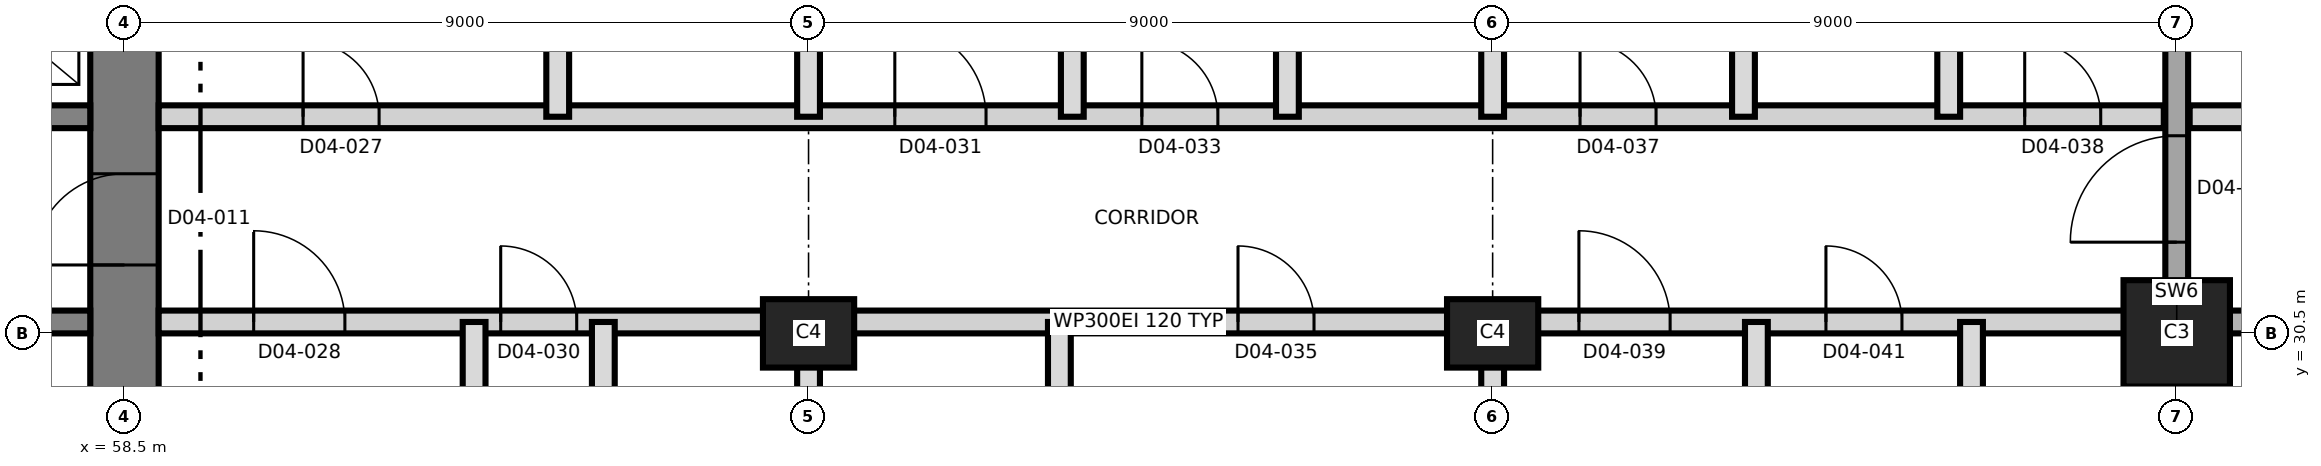
"""IFC4 building model, lengths in metres.
Left out: names, types, materials, properties, quantities, classifications, styles, units other than length and angle.
Written with IfcOpenShell. Run it as: python <this file> out.ifc"""

import sys

from ifc_helpers import new_model, si_unit, direction, frame, frame_2d, origin, origin_2d, place, context, subcontext, project, spatial, rectangle, extrude, element, fill, save


model = new_model("IFC4")
c1 = context("Model", 3, precision=1e-05, world=origin(), true_north=direction((0.0, 1.0)))
c2 = subcontext(c1, "Body", "Model", "MODEL_VIEW")
j1 = project(units=[si_unit("LENGTHUNIT", "METRE"), si_unit("PLANEANGLEUNIT", "RADIAN")], contexts=[c1])
p1 = place(None, origin())
s1 = spatial("IfcSite", under=j1, at=p1, CompositionType="ELEMENT")
p2 = place(p1, origin())
s2 = spatial("IfcBuilding", under=s1, at=p2, CompositionType="ELEMENT")
p3 = place(p2, frame((0.0, 0.0, 66.8)))
s3 = spatial("IfcBuildingStorey", under=s2, at=p3, CompositionType="ELEMENT", Elevation=66.8)
p4 = place(p3, frame((58.5, 21.05, 0.0), z_axis=(0.0, 0.0, 1.0), x_axis=(0.0, 1.0, 0.0)))
e1 = element("IfcWall", 1, at=p4, inside=s3, PredefinedType="SHEAR", context=c2, shape_type="SweptSolid", body=[
    extrude(rectangle(XDim=18.9, YDim=0.9, at=frame_2d((9.45, 0.0))), origin(), (0.0, 0.0, 1.0), 3.7),
])
p5 = place(p4, frame((10.35, 0.0, 0.0)))
e2 = element("IfcOpeningElement", 2, at=p5, cuts=e1, PredefinedType="OPENING", context=c2, shape_type="SweptSolid", body=[
    extrude(rectangle(XDim=1.2, YDim=2.1, at=frame_2d((0.6, 1.05))), frame((0.0, 0.46, 0.0), z_axis=(0.0, -1.0, 0.0), x_axis=(1.0, 0.0, 0.0)), (0.0, 0.0, 1.0), 0.92),
])
p6 = place(p3, frame((31.95, 30.65, 0.0), z_axis=(0.0, 0.0, 1.0), x_axis=(1.0, 0.0, 0.0)))
e3 = element("IfcWall", 3, at=p6, inside=s3, PredefinedType="SHEAR", context=c2, shape_type="SweptSolid", body=[
    extrude(rectangle(XDim=26.1, YDim=0.3, at=frame_2d((13.05, 0.0))), origin(), (0.0, 0.0, 1.0), 3.7),
])
p7 = place(p6, frame((24.55, 0.0, 0.0)))
e4 = element("IfcOpeningElement", 4, at=p7, cuts=e3, PredefinedType="OPENING", context=c2, shape_type="SweptSolid", body=[
    extrude(rectangle(XDim=1.0, YDim=2.1, at=frame_2d((0.5, 1.05))), frame((0.0, 0.16, 0.0), z_axis=(0.0, -1.0, 0.0), x_axis=(1.0, 0.0, 0.0)), (0.0, 0.0, 1.0), 0.32),
])
p8 = place(p6, frame((11.35, 0.0, 0.0)))
e5 = element("IfcOpeningElement", 5, at=p8, cuts=e3, PredefinedType="OPENING", context=c2, shape_type="SweptSolid", body=[
    extrude(rectangle(XDim=1.0, YDim=2.1, at=frame_2d((0.5, 1.05))), frame((0.0, 0.16, 0.0), z_axis=(0.0, -1.0, 0.0), x_axis=(1.0, 0.0, 0.0)), (0.0, 0.0, 1.0), 0.32),
])
p9 = place(p3, frame((31.95, 33.35, 0.0), z_axis=(0.0, 0.0, 1.0), x_axis=(1.0, 0.0, 0.0)))
e6 = element("IfcWall", 6, at=p9, inside=s3, PredefinedType="SHEAR", context=c2, shape_type="SweptSolid", body=[
    extrude(rectangle(XDim=26.1, YDim=0.3, at=frame_2d((13.05, 0.0))), origin(), (0.0, 0.0, 1.0), 3.7),
])
p10 = place(p9, frame((13.7, 0.0, 0.0)))
e7 = element("IfcOpeningElement", 7, at=p10, cuts=e6, PredefinedType="OPENING", context=c2, shape_type="SweptSolid", body=[
    extrude(rectangle(XDim=1.4, YDim=2.1, at=frame_2d((0.7, 1.05))), frame((0.0, 0.16, 0.0), z_axis=(0.0, -1.0, 0.0), x_axis=(1.0, 0.0, 0.0)), (0.0, 0.0, 1.0), 0.32),
])
p11 = place(p9, frame((5.175, 0.0, 0.0)))
e8 = element("IfcOpeningElement", 8, at=p11, cuts=e6, PredefinedType="OPENING", context=c2, shape_type="SweptSolid", body=[
    extrude(rectangle(XDim=1.2, YDim=2.1, at=frame_2d((0.6, 1.05))), frame((0.0, 0.16, 0.0), z_axis=(0.0, -1.0, 0.0), x_axis=(1.0, 0.0, 0.0)), (0.0, 0.0, 1.0), 0.32),
])
p12 = place(p9, frame((19.725, 0.0, 0.0)))
e9 = element("IfcOpeningElement", 9, at=p12, cuts=e6, PredefinedType="OPENING", context=c2, shape_type="SweptSolid", body=[
    extrude(rectangle(XDim=1.2, YDim=2.1, at=frame_2d((0.6, 1.05))), frame((0.0, 0.16, 0.0), z_axis=(0.0, -1.0, 0.0), x_axis=(1.0, 0.0, 0.0)), (0.0, 0.0, 1.0), 0.32),
])
for number, where, z_axis, x_axis in (
    (10, (67.5, 30.5, 0.0), (0.0, 0.0, 1.0), (1.0, 0.0, 0.0)),
    (11, (76.5, 30.5, 0.0), (0.0, 0.0, 1.0), (1.0, 0.0, 0.0)),
):
    element("IfcColumn", number, at=place(p3, frame(where, z_axis=z_axis, x_axis=x_axis)), inside=s3, PredefinedType="COLUMN", context=c2, shape_type="SweptSolid", body=[
        extrude(rectangle(XDim=1.2, YDim=0.9, at=origin_2d()), origin(), (0.0, 0.0, 1.0), 3.7),
    ])
p13 = place(p3, frame((85.5, 30.5, 0.0), z_axis=(0.0, 0.0, 1.0), x_axis=(1.0, 0.0, 0.0)))
e12 = element("IfcColumn", 12, at=p13, inside=s3, PredefinedType="COLUMN", context=c2, shape_type="SweptSolid", body=[
    extrude(rectangle(XDim=1.4, YDim=1.4, at=origin_2d()), origin(), (0.0, 0.0, 1.0), 3.7),
])
p14 = place(p3, frame((85.5, 19.17, 0.0), z_axis=(0.0, 0.0, 1.0), x_axis=(0.0, 1.0, 0.0)))
e13 = element("IfcWall", 13, at=p14, inside=s3, PredefinedType="SHEAR", context=c2, shape_type="SweptSolid", body=[
    extrude(rectangle(XDim=22.66, YDim=0.3, at=frame_2d((11.33, 0.0))), origin(), (0.0, 0.0, 1.0), 3.7),
])
p15 = place(p14, frame((12.53, 0.0, 0.0)))
e14 = element("IfcOpeningElement", 14, at=p15, cuts=e13, PredefinedType="OPENING", context=c2, shape_type="SweptSolid", body=[
    extrude(rectangle(XDim=1.4, YDim=2.1, at=frame_2d((0.7, 1.05))), frame((0.0, 0.16, 0.0), z_axis=(0.0, -1.0, 0.0), x_axis=(1.0, 0.0, 0.0)), (0.0, 0.0, 1.0), 0.32),
])
p16 = place(p3, frame((58.95, 30.65, 0.0), z_axis=(0.0, 0.0, 1.0), x_axis=(1.0, 0.0, 0.0)))
e15 = element("IfcWall", 15, at=p16, inside=s3, PredefinedType="PARTITIONING", context=c2, shape_type="SweptSolid", body=[
    extrude(rectangle(XDim=26.38, YDim=0.3, at=frame_2d((13.19, 0.0))), origin(), (0.0, 0.0, 1.0), 3.4),
])
p17 = place(p16, frame((1.25, 0.0, 0.0)))
e16 = element("IfcOpeningElement", 16, at=p17, cuts=e15, PredefinedType="OPENING", context=c2, shape_type="SweptSolid", body=[
    extrude(rectangle(XDim=1.2, YDim=2.1, at=frame_2d((0.6, 1.05))), frame((0.0, 0.16, 0.0), z_axis=(0.0, -1.0, 0.0), x_axis=(1.0, 0.0, 0.0)), (0.0, 0.0, 1.0), 0.32),
])
p18 = place(p16, frame((4.5, 0.0, 0.0)))
e17 = element("IfcOpeningElement", 17, at=p18, cuts=e15, PredefinedType="OPENING", context=c2, shape_type="SweptSolid", body=[
    extrude(rectangle(XDim=1.0, YDim=2.1, at=frame_2d((0.5, 1.05))), frame((0.0, 0.16, 0.0), z_axis=(0.0, -1.0, 0.0), x_axis=(1.0, 0.0, 0.0)), (0.0, 0.0, 1.0), 0.32),
])
p19 = place(p16, frame((14.2, 0.0, 0.0)))
e18 = element("IfcOpeningElement", 18, at=p19, cuts=e15, PredefinedType="OPENING", context=c2, shape_type="SweptSolid", body=[
    extrude(rectangle(XDim=1.0, YDim=2.4, at=frame_2d((0.5, 1.2))), frame((0.0, 0.16, 0.0), z_axis=(0.0, -1.0, 0.0), x_axis=(1.0, 0.0, 0.0)), (0.0, 0.0, 1.0), 0.32),
])
p20 = place(p16, frame((18.685, 0.0, 0.0)))
e19 = element("IfcOpeningElement", 19, at=p20, cuts=e15, PredefinedType="OPENING", context=c2, shape_type="SweptSolid", body=[
    extrude(rectangle(XDim=1.2, YDim=2.1, at=frame_2d((0.6, 1.05))), frame((0.0, 0.16, 0.0), z_axis=(0.0, -1.0, 0.0), x_axis=(1.0, 0.0, 0.0)), (0.0, 0.0, 1.0), 0.32),
])
p21 = place(p16, frame((21.935, 0.0, 0.0)))
e20 = element("IfcOpeningElement", 20, at=p21, cuts=e15, PredefinedType="OPENING", context=c2, shape_type="SweptSolid", body=[
    extrude(rectangle(XDim=1.0, YDim=2.1, at=frame_2d((0.5, 1.05))), frame((0.0, 0.16, 0.0), z_axis=(0.0, -1.0, 0.0), x_axis=(1.0, 0.0, 0.0)), (0.0, 0.0, 1.0), 0.32),
])
p22 = place(p3, frame((85.67, 30.65, 0.0), z_axis=(0.0, 0.0, 1.0), x_axis=(1.0, 0.0, 0.0)))
e21 = element("IfcWall", 21, at=p22, inside=s3, PredefinedType="SHEAR", context=c2, shape_type="SweptSolid", body=[
    extrude(rectangle(XDim=9.58, YDim=0.3, at=frame_2d((4.79, 0.0))), origin(), (0.0, 0.0, 1.0), 3.4),
])
p23 = place(p22, frame((2.08, 0.0, 0.0)))
e22 = element("IfcOpeningElement", 22, at=p23, cuts=e21, PredefinedType="OPENING", context=c2, shape_type="SweptSolid", body=[
    extrude(rectangle(XDim=1.2, YDim=2.1, at=frame_2d((0.6, 1.05))), frame((0.0, 0.16, 0.0), z_axis=(0.0, -1.0, 0.0), x_axis=(1.0, 0.0, 0.0)), (0.0, 0.0, 1.0), 0.32),
])
p24 = place(p22, frame((5.63, 0.0, 0.0)))
e23 = element("IfcOpeningElement", 23, at=p24, cuts=e21, PredefinedType="OPENING", context=c2, shape_type="SweptSolid", body=[
    extrude(rectangle(XDim=1.0, YDim=2.1, at=frame_2d((0.5, 1.05))), frame((0.0, 0.16, 0.0), z_axis=(0.0, -1.0, 0.0), x_axis=(1.0, 0.0, 0.0)), (0.0, 0.0, 1.0), 0.32),
])
p25 = place(p3, frame((58.95, 33.35, 0.0), z_axis=(0.0, 0.0, 1.0), x_axis=(1.0, 0.0, 0.0)))
e24 = element("IfcWall", 24, at=p25, inside=s3, PredefinedType="PARTITIONING", context=c2, shape_type="SweptSolid", body=[
    extrude(rectangle(XDim=26.38, YDim=0.3, at=frame_2d((13.19, 0.0))), origin(), (0.0, 0.0, 1.0), 3.4),
])
p26 = place(p25, frame((1.9, 0.0, 0.0)))
e25 = element("IfcOpeningElement", 25, at=p26, cuts=e24, PredefinedType="OPENING", context=c2, shape_type="SweptSolid", body=[
    extrude(rectangle(XDim=1.0, YDim=2.4, at=frame_2d((0.5, 1.2))), frame((0.0, 0.16, 0.0), z_axis=(0.0, -1.0, 0.0), x_axis=(1.0, 0.0, 0.0)), (0.0, 0.0, 1.0), 0.32),
])
p27 = place(p25, frame((9.685, 0.0, 0.0)))
e26 = element("IfcOpeningElement", 26, at=p27, cuts=e24, PredefinedType="OPENING", context=c2, shape_type="SweptSolid", body=[
    extrude(rectangle(XDim=1.2, YDim=2.1, at=frame_2d((0.6, 1.05))), frame((0.0, 0.16, 0.0), z_axis=(0.0, -1.0, 0.0), x_axis=(1.0, 0.0, 0.0)), (0.0, 0.0, 1.0), 0.32),
])
p28 = place(p25, frame((12.935, 0.0, 0.0)))
e27 = element("IfcOpeningElement", 27, at=p28, cuts=e24, PredefinedType="OPENING", context=c2, shape_type="SweptSolid", body=[
    extrude(rectangle(XDim=1.0, YDim=2.1, at=frame_2d((0.5, 1.05))), frame((0.0, 0.16, 0.0), z_axis=(0.0, -1.0, 0.0), x_axis=(1.0, 0.0, 0.0)), (0.0, 0.0, 1.0), 0.32),
])
p29 = place(p25, frame((18.7, 0.0, 0.0)))
e28 = element("IfcOpeningElement", 28, at=p29, cuts=e24, PredefinedType="OPENING", context=c2, shape_type="SweptSolid", body=[
    extrude(rectangle(XDim=1.0, YDim=2.1, at=frame_2d((0.5, 1.05))), frame((0.0, 0.16, 0.0), z_axis=(0.0, -1.0, 0.0), x_axis=(1.0, 0.0, 0.0)), (0.0, 0.0, 1.0), 0.32),
])
p30 = place(p25, frame((24.55, 0.0, 0.0)))
e29 = element("IfcOpeningElement", 29, at=p30, cuts=e24, PredefinedType="OPENING", context=c2, shape_type="SweptSolid", body=[
    extrude(rectangle(XDim=1.0, YDim=2.1, at=frame_2d((0.5, 1.05))), frame((0.0, 0.16, 0.0), z_axis=(0.0, -1.0, 0.0), x_axis=(1.0, 0.0, 0.0)), (0.0, 0.0, 1.0), 0.32),
])
p31 = place(p3, frame((85.67, 33.35, 0.0), z_axis=(0.0, 0.0, 1.0), x_axis=(1.0, 0.0, 0.0)))
e30 = element("IfcWall", 30, at=p31, inside=s3, PredefinedType="PARTITIONING", context=c2, shape_type="SweptSolid", body=[
    extrude(rectangle(XDim=9.58, YDim=0.3, at=frame_2d((4.79, 0.0))), origin(), (0.0, 0.0, 1.0), 3.4),
])
p32 = place(p31, frame((1.83, 0.0, 0.0)))
e31 = element("IfcOpeningElement", 31, at=p32, cuts=e30, PredefinedType="OPENING", context=c2, shape_type="SweptSolid", body=[
    extrude(rectangle(XDim=1.0, YDim=2.1, at=frame_2d((0.5, 1.05))), frame((0.0, 0.16, 0.0), z_axis=(0.0, -1.0, 0.0), x_axis=(1.0, 0.0, 0.0)), (0.0, 0.0, 1.0), 0.32),
])
p33 = place(p31, frame((5.63, 0.0, 0.0)))
e32 = element("IfcOpeningElement", 32, at=p33, cuts=e30, PredefinedType="OPENING", context=c2, shape_type="SweptSolid", body=[
    extrude(rectangle(XDim=1.0, YDim=2.1, at=frame_2d((0.5, 1.05))), frame((0.0, 0.16, 0.0), z_axis=(0.0, -1.0, 0.0), x_axis=(1.0, 0.0, 0.0)), (0.0, 0.0, 1.0), 0.32),
])
p34 = place(p3, frame((63.1, 19.17, 0.0), z_axis=(0.0, 0.0, 1.0), x_axis=(0.0, 1.0, 0.0)))
e33 = element("IfcWall", 33, at=p34, inside=s3, PredefinedType="PARTITIONING", context=c2, shape_type="SweptSolid", body=[
    extrude(rectangle(XDim=11.48, YDim=0.3, at=frame_2d((5.74, 0.0))), origin(), (0.0, 0.0, 1.0), 3.35),
])
p35 = place(p3, frame((64.2, 33.35, 0.0), z_axis=(0.0, 0.0, 1.0), x_axis=(0.0, 1.0, 0.0)))
e34 = element("IfcWall", 34, at=p35, inside=s3, PredefinedType="PARTITIONING", context=c2, shape_type="SweptSolid", body=[
    extrude(rectangle(XDim=3.5, YDim=0.3, at=frame_2d((1.75, 0.0))), origin(), (0.0, 0.0, 1.0), 3.4),
])
p36 = place(p3, frame((64.8, 27.45, 0.0), z_axis=(0.0, 0.0, 1.0), x_axis=(0.0, 1.0, 0.0)))
e35 = element("IfcWall", 35, at=p36, inside=s3, PredefinedType="PARTITIONING", context=c2, shape_type="SweptSolid", body=[
    extrude(rectangle(XDim=3.2, YDim=0.3, at=frame_2d((1.6, 0.0))), origin(), (0.0, 0.0, 1.0), 3.4),
])
p37 = place(p3, frame((67.5, 19.17, 0.0), z_axis=(0.0, 0.0, 1.0), x_axis=(0.0, 1.0, 0.0)))
e36 = element("IfcWall", 36, at=p37, inside=s3, PredefinedType="PARTITIONING", context=c2, shape_type="SweptSolid", body=[
    extrude(rectangle(XDim=11.48, YDim=0.3, at=frame_2d((5.74, 0.0))), origin(), (0.0, 0.0, 1.0), 3.35),
])
p38 = place(p3, frame((67.5, 33.35, 0.0), z_axis=(0.0, 0.0, 1.0), x_axis=(0.0, 1.0, 0.0)))
e37 = element("IfcWall", 37, at=p38, inside=s3, PredefinedType="PARTITIONING", context=c2, shape_type="SweptSolid", body=[
    extrude(rectangle(XDim=8.66, YDim=0.3, at=frame_2d((4.33, 0.0))), origin(), (0.0, 0.0, 1.0), 3.35),
])
p39 = place(p3, frame((70.8, 27.15, 0.0), z_axis=(0.0, 0.0, 1.0), x_axis=(0.0, 1.0, 0.0)))
e38 = element("IfcWall", 38, at=p39, inside=s3, PredefinedType="PARTITIONING", context=c2, shape_type="SweptSolid", body=[
    extrude(rectangle(XDim=3.5, YDim=0.3, at=frame_2d((1.75, 0.0))), origin(), (0.0, 0.0, 1.0), 3.4),
])
p40 = place(p3, frame((70.97, 33.35, 0.0), z_axis=(0.0, 0.0, 1.0), x_axis=(0.0, 1.0, 0.0)))
e39 = element("IfcWall", 39, at=p40, inside=s3, PredefinedType="PARTITIONING", context=c2, shape_type="SweptSolid", body=[
    extrude(rectangle(XDim=8.66, YDim=0.3, at=frame_2d((4.33, 0.0))), origin(), (0.0, 0.0, 1.0), 3.35),
])
p41 = place(p3, frame((73.8, 33.35, 0.0), z_axis=(0.0, 0.0, 1.0), x_axis=(0.0, 1.0, 0.0)))
e40 = element("IfcWall", 40, at=p41, inside=s3, PredefinedType="PARTITIONING", context=c2, shape_type="SweptSolid", body=[
    extrude(rectangle(XDim=3.2, YDim=0.3, at=frame_2d((1.6, 0.0))), origin(), (0.0, 0.0, 1.0), 3.4),
])
p42 = place(p3, frame((76.5, 19.17, 0.0), z_axis=(0.0, 0.0, 1.0), x_axis=(0.0, 1.0, 0.0)))
e41 = element("IfcWall", 41, at=p42, inside=s3, PredefinedType="PARTITIONING", context=c2, shape_type="SweptSolid", body=[
    extrude(rectangle(XDim=11.48, YDim=0.3, at=frame_2d((5.74, 0.0))), origin(), (0.0, 0.0, 1.0), 3.35),
])
p43 = place(p3, frame((76.5, 33.35, 0.0), z_axis=(0.0, 0.0, 1.0), x_axis=(0.0, 1.0, 0.0)))
e42 = element("IfcWall", 42, at=p43, inside=s3, PredefinedType="PARTITIONING", context=c2, shape_type="SweptSolid", body=[
    extrude(rectangle(XDim=8.66, YDim=0.3, at=frame_2d((4.33, 0.0))), origin(), (0.0, 0.0, 1.0), 3.35),
])
p44 = place(p3, frame((79.8, 33.35, 0.0), z_axis=(0.0, 0.0, 1.0), x_axis=(0.0, 1.0, 0.0)))
e43 = element("IfcWall", 43, at=p44, inside=s3, PredefinedType="PARTITIONING", context=c2, shape_type="SweptSolid", body=[
    extrude(rectangle(XDim=3.2, YDim=0.3, at=frame_2d((1.6, 0.0))), origin(), (0.0, 0.0, 1.0), 3.4),
])
p45 = place(p3, frame((79.97, 19.17, 0.0), z_axis=(0.0, 0.0, 1.0), x_axis=(0.0, 1.0, 0.0)))
e44 = element("IfcWall", 44, at=p45, inside=s3, PredefinedType="PARTITIONING", context=c2, shape_type="SweptSolid", body=[
    extrude(rectangle(XDim=11.48, YDim=0.3, at=frame_2d((5.74, 0.0))), origin(), (0.0, 0.0, 1.0), 3.35),
])
p46 = place(p3, frame((82.5, 33.35, 0.0), z_axis=(0.0, 0.0, 1.0), x_axis=(0.0, 1.0, 0.0)))
e45 = element("IfcWall", 45, at=p46, inside=s3, PredefinedType="PARTITIONING", context=c2, shape_type="SweptSolid", body=[
    extrude(rectangle(XDim=8.66, YDim=0.3, at=frame_2d((4.33, 0.0))), origin(), (0.0, 0.0, 1.0), 3.35),
])
p47 = place(p3, frame((82.8, 27.45, 0.0), z_axis=(0.0, 0.0, 1.0), x_axis=(0.0, 1.0, 0.0)))
e46 = element("IfcWall", 46, at=p47, inside=s3, PredefinedType="PARTITIONING", context=c2, shape_type="SweptSolid", body=[
    extrude(rectangle(XDim=3.2, YDim=0.3, at=frame_2d((1.6, 0.0))), origin(), (0.0, 0.0, 1.0), 3.4),
])
p48 = place(p5, origin())
e47 = element("IfcDoor", 47, at=p48, inside=s3, OperationType="SINGLE_SWING_LEFT", PredefinedType="DOOR", context=c2, shape_type="SweptSolid", body=[
    extrude(rectangle(XDim=1.2, YDim=2.1, at=frame_2d((0.6, 1.05))), frame((0.0, 0.025, 0.0), z_axis=(0.0, -1.0, 0.0), x_axis=(1.0, 0.0, 0.0)), (0.0, 0.0, 1.0), 0.05),
])
fill(e2, e47)
p49 = place(p26, origin())
e48 = element("IfcDoor", 48, at=p49, inside=s3, OperationType="SINGLE_SWING_LEFT", PredefinedType="DOOR", context=c2, shape_type="SweptSolid", body=[
    extrude(rectangle(XDim=1.0, YDim=2.4, at=frame_2d((0.5, 1.2))), frame((0.0, 0.025, 0.0), z_axis=(0.0, -1.0, 0.0), x_axis=(1.0, 0.0, 0.0)), (0.0, 0.0, 1.0), 0.05),
])
fill(e25, e48)
p50 = place(p17, origin())
e49 = element("IfcDoor", 49, at=p50, inside=s3, OperationType="SINGLE_SWING_RIGHT", PredefinedType="DOOR", context=c2, shape_type="SweptSolid", body=[
    extrude(rectangle(XDim=1.2, YDim=2.1, at=frame_2d((0.6, 1.05))), frame((0.0, 0.025, 0.0), z_axis=(0.0, -1.0, 0.0), x_axis=(1.0, 0.0, 0.0)), (0.0, 0.0, 1.0), 0.05),
])
fill(e16, e49)
p51 = place(p18, origin())
e50 = element("IfcDoor", 50, at=p51, inside=s3, OperationType="SINGLE_SWING_LEFT", PredefinedType="DOOR", context=c2, shape_type="SweptSolid", body=[
    extrude(rectangle(XDim=1.0, YDim=2.1, at=frame_2d((0.5, 1.05))), frame((0.0, 0.025, 0.0), z_axis=(0.0, -1.0, 0.0), x_axis=(1.0, 0.0, 0.0)), (0.0, 0.0, 1.0), 0.05),
])
fill(e17, e50)
p52 = place(p27, origin())
e51 = element("IfcDoor", 51, at=p52, inside=s3, OperationType="SINGLE_SWING_RIGHT", PredefinedType="DOOR", context=c2, shape_type="SweptSolid", body=[
    extrude(rectangle(XDim=1.2, YDim=2.1, at=frame_2d((0.6, 1.05))), frame((0.0, 0.025, 0.0), z_axis=(0.0, -1.0, 0.0), x_axis=(1.0, 0.0, 0.0)), (0.0, 0.0, 1.0), 0.05),
])
fill(e26, e51)
p53 = place(p28, origin())
e52 = element("IfcDoor", 52, at=p53, inside=s3, OperationType="SINGLE_SWING_LEFT", PredefinedType="DOOR", context=c2, shape_type="SweptSolid", body=[
    extrude(rectangle(XDim=1.0, YDim=2.1, at=frame_2d((0.5, 1.05))), frame((0.0, 0.025, 0.0), z_axis=(0.0, -1.0, 0.0), x_axis=(1.0, 0.0, 0.0)), (0.0, 0.0, 1.0), 0.05),
])
fill(e27, e52)
p54 = place(p19, origin())
e53 = element("IfcDoor", 53, at=p54, inside=s3, OperationType="SINGLE_SWING_RIGHT", PredefinedType="DOOR", context=c2, shape_type="SweptSolid", body=[
    extrude(rectangle(XDim=1.0, YDim=2.4, at=frame_2d((0.5, 1.2))), frame((0.0, 0.025, 0.0), z_axis=(0.0, -1.0, 0.0), x_axis=(1.0, 0.0, 0.0)), (0.0, 0.0, 1.0), 0.05),
])
fill(e18, e53)
p55 = place(p29, origin())
e54 = element("IfcDoor", 54, at=p55, inside=s3, OperationType="SINGLE_SWING_LEFT", PredefinedType="DOOR", context=c2, shape_type="SweptSolid", body=[
    extrude(rectangle(XDim=1.0, YDim=2.1, at=frame_2d((0.5, 1.05))), frame((0.0, 0.025, 0.0), z_axis=(0.0, -1.0, 0.0), x_axis=(1.0, 0.0, 0.0)), (0.0, 0.0, 1.0), 0.05),
])
fill(e28, e54)
p56 = place(p30, origin())
e55 = element("IfcDoor", 55, at=p56, inside=s3, OperationType="SINGLE_SWING_LEFT", PredefinedType="DOOR", context=c2, shape_type="SweptSolid", body=[
    extrude(rectangle(XDim=1.0, YDim=2.1, at=frame_2d((0.5, 1.05))), frame((0.0, 0.025, 0.0), z_axis=(0.0, -1.0, 0.0), x_axis=(1.0, 0.0, 0.0)), (0.0, 0.0, 1.0), 0.05),
])
fill(e29, e55)
p57 = place(p20, origin())
e56 = element("IfcDoor", 56, at=p57, inside=s3, OperationType="SINGLE_SWING_LEFT", PredefinedType="DOOR", context=c2, shape_type="SweptSolid", body=[
    extrude(rectangle(XDim=1.2, YDim=2.1, at=frame_2d((0.6, 1.05))), frame((0.0, 0.025, 0.0), z_axis=(0.0, -1.0, 0.0), x_axis=(1.0, 0.0, 0.0)), (0.0, 0.0, 1.0), 0.05),
])
fill(e19, e56)
p58 = place(p21, origin())
e57 = element("IfcDoor", 57, at=p58, inside=s3, OperationType="SINGLE_SWING_RIGHT", PredefinedType="DOOR", context=c2, shape_type="SweptSolid", body=[
    extrude(rectangle(XDim=1.0, YDim=2.1, at=frame_2d((0.5, 1.05))), frame((0.0, 0.025, 0.0), z_axis=(0.0, -1.0, 0.0), x_axis=(1.0, 0.0, 0.0)), (0.0, 0.0, 1.0), 0.05),
])
fill(e20, e57)
p59 = place(p15, origin())
e58 = element("IfcDoor", 58, at=p59, inside=s3, OperationType="SINGLE_SWING_RIGHT", PredefinedType="DOOR", context=c2, shape_type="SweptSolid", body=[
    extrude(rectangle(XDim=1.4, YDim=2.1, at=frame_2d((0.7, 1.05))), frame((0.0, 0.025, 0.0), z_axis=(0.0, -1.0, 0.0), x_axis=(1.0, 0.0, 0.0)), (0.0, 0.0, 1.0), 0.05),
])
fill(e14, e58)
save(model, sys.argv[1])
